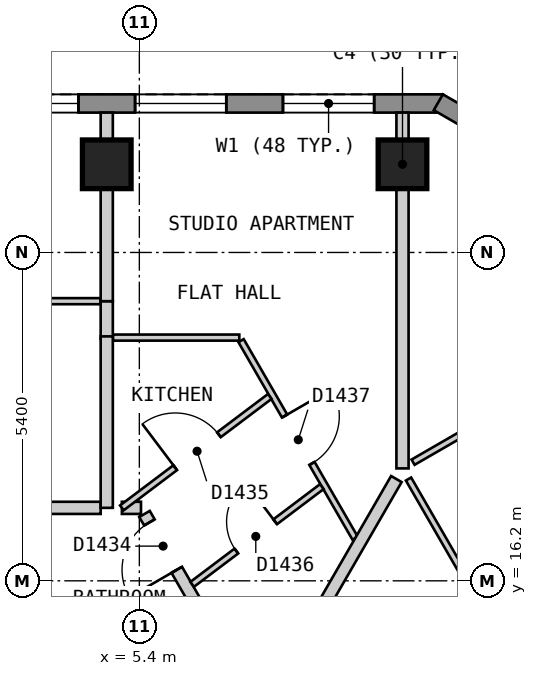
"""IFC4 building model, lengths in metres.
Left out: names, types, materials, properties, quantities, classifications, styles, units other than length and angle.
Written with IfcOpenShell. Run it as: python <this file> out.ifc"""

import sys

from ifc_helpers import new_model, si_unit, direction, frame, frame_2d, origin, origin_2d, place, context, subcontext, project, spatial, polyline, rectangle, outline, extrude, element, fill, save


model = new_model("IFC4")
c1 = context("Model", 3, precision=1e-05, world=origin(), true_north=direction((0.0, 1.0)))
c2 = subcontext(c1, "Body", "Model", "MODEL_VIEW")
j1 = project(units=[si_unit("LENGTHUNIT", "METRE"), si_unit("PLANEANGLEUNIT", "RADIAN")], contexts=[c1])
p1 = place(None, origin())
s1 = spatial("IfcSite", under=j1, at=p1, CompositionType="ELEMENT")
p2 = place(p1, origin())
s2 = spatial("IfcBuilding", under=s1, at=p2, CompositionType="ELEMENT")
p3 = place(p2, frame((0.0, 0.0, 166.2)))
s3 = spatial("IfcBuildingStorey", under=s2, at=p3, CompositionType="ELEMENT", Elevation=166.2)
for number, where, z_axis, x_axis in (
    (1, (9.728, 23.05, 0.0), (0.0, 0.0, 1.0), (-1.0, 0.0, 0.0)),
    (2, (4.864, 23.05, 0.0), (0.0, 0.0, 1.0), (-1.0, 0.0, 0.0)),
):
    element("IfcColumn", number, at=place(p3, frame(where, z_axis=z_axis, x_axis=x_axis)), inside=s3, PredefinedType="COLUMN", context=c2, shape_type="SweptSolid", body=[
        extrude(rectangle(XDim=0.8, YDim=0.8, at=origin_2d()), origin(), (0.0, 0.0, 1.0), 3.0),
    ])
p4 = place(p3, frame((10.392, 24.05, 0.0), z_axis=(0.0, 0.0, 1.0), x_axis=(-1.0, 0.0, 0.0)))
e3 = element("IfcWall", 3, at=p4, inside=s3, PredefinedType="SOLIDWALL", context=c2, shape_type="SweptSolid", body=[
    extrude(outline(polyline([(0.0, -0.15), (20.784, -0.15), (20.704, 0.15), (0.08, 0.15), (0.0, -0.15)])), origin(), (0.0, 0.0, 1.0), 2.7),
])
p5 = place(p4, frame((1.13, 0.0, 0.15)))
e4 = element("IfcOpeningElement", 4, at=p5, cuts=e3, PredefinedType="OPENING", context=c2, shape_type="SweptSolid", body=[
    extrude(rectangle(XDim=1.5, YDim=2.1, at=frame_2d((0.75, 1.05))), frame((0.0, 0.16, 0.0), z_axis=(0.0, -1.0, 0.0), x_axis=(1.0, 0.0, 0.0)), (0.0, 0.0, 1.0), 0.32),
])
p6 = place(p4, frame((3.562, 0.0, 0.15)))
e5 = element("IfcOpeningElement", 5, at=p6, cuts=e3, PredefinedType="OPENING", context=c2, shape_type="SweptSolid", body=[
    extrude(rectangle(XDim=1.5, YDim=2.1, at=frame_2d((0.75, 1.05))), frame((0.0, 0.16, 0.0), z_axis=(0.0, -1.0, 0.0), x_axis=(1.0, 0.0, 0.0)), (0.0, 0.0, 1.0), 0.32),
])
p7 = place(p4, frame((5.994, 0.0, 0.15)))
e6 = element("IfcOpeningElement", 6, at=p7, cuts=e3, PredefinedType="OPENING", context=c2, shape_type="SweptSolid", body=[
    extrude(rectangle(XDim=1.5, YDim=2.1, at=frame_2d((0.75, 1.05))), frame((0.0, 0.16, 0.0), z_axis=(0.0, -1.0, 0.0), x_axis=(1.0, 0.0, 0.0)), (0.0, 0.0, 1.0), 0.32),
])
p8 = place(p4, frame((8.426, 0.0, 0.15)))
e7 = element("IfcOpeningElement", 7, at=p8, cuts=e3, PredefinedType="OPENING", context=c2, shape_type="SweptSolid", body=[
    extrude(rectangle(XDim=1.5, YDim=2.1, at=frame_2d((0.75, 1.05))), frame((0.0, 0.16, 0.0), z_axis=(0.0, -1.0, 0.0), x_axis=(1.0, 0.0, 0.0)), (0.0, 0.0, 1.0), 0.32),
])
p9 = place(p4, frame((10.858, 0.0, 0.15)))
e8 = element("IfcOpeningElement", 8, at=p9, cuts=e3, PredefinedType="OPENING", context=c2, shape_type="SweptSolid", body=[
    extrude(rectangle(XDim=1.5, YDim=2.1, at=frame_2d((0.75, 1.05))), frame((0.0, 0.16, 0.0), z_axis=(0.0, -1.0, 0.0), x_axis=(1.0, 0.0, 0.0)), (0.0, 0.0, 1.0), 0.32),
])
p10 = place(p4, frame((13.29, 0.0, 0.15)))
e9 = element("IfcOpeningElement", 9, at=p10, cuts=e3, PredefinedType="OPENING", context=c2, shape_type="SweptSolid", body=[
    extrude(rectangle(XDim=1.5, YDim=2.1, at=frame_2d((0.75, 1.05))), frame((0.0, 0.16, 0.0), z_axis=(0.0, -1.0, 0.0), x_axis=(1.0, 0.0, 0.0)), (0.0, 0.0, 1.0), 0.32),
])
p11 = place(p4, frame((15.722, 0.0, 0.15)))
e10 = element("IfcOpeningElement", 10, at=p11, cuts=e3, PredefinedType="OPENING", context=c2, shape_type="SweptSolid", body=[
    extrude(rectangle(XDim=1.5, YDim=2.1, at=frame_2d((0.75, 1.05))), frame((0.0, 0.16, 0.0), z_axis=(0.0, -1.0, 0.0), x_axis=(1.0, 0.0, 0.0)), (0.0, 0.0, 1.0), 0.32),
])
p12 = place(p4, frame((18.154, 0.0, 0.15)))
e11 = element("IfcOpeningElement", 11, at=p12, cuts=e3, PredefinedType="OPENING", context=c2, shape_type="SweptSolid", body=[
    extrude(rectangle(XDim=1.5, YDim=2.1, at=frame_2d((0.75, 1.05))), frame((0.0, 0.16, 0.0), z_axis=(0.0, -1.0, 0.0), x_axis=(1.0, 0.0, 0.0)), (0.0, 0.0, 1.0), 0.32),
])
p13 = place(p3, frame((14.647, 21.57, 0.0), z_axis=(0.0, 0.0, 1.0), x_axis=(-0.866022959057, 0.500004234368, 0.0)))
e12 = element("IfcWall", 12, at=p13, inside=s3, PredefinedType="SOLIDWALL", context=c2, shape_type="SweptSolid", body=[
    extrude(outline(polyline([(0.0, -0.15), (5.0, -0.15), (4.92, 0.15), (0.08, 0.15), (0.0, -0.15)])), origin(), (0.0, 0.0, 1.0), 2.7),
])
p14 = place(p13, frame((0.65, 0.0, 0.15)))
e13 = element("IfcOpeningElement", 13, at=p14, cuts=e12, PredefinedType="OPENING", context=c2, shape_type="SweptSolid", body=[
    extrude(rectangle(XDim=1.2, YDim=2.1, at=frame_2d((0.6, 1.05))), frame((0.0, 0.16, 0.0), z_axis=(0.0, -1.0, 0.0), x_axis=(1.0, 0.0, 0.0)), (0.0, 0.0, 1.0), 0.32),
])
p15 = place(p13, frame((3.15, 0.0, 0.15)))
e14 = element("IfcOpeningElement", 14, at=p15, cuts=e12, PredefinedType="OPENING", context=c2, shape_type="SweptSolid", body=[
    extrude(rectangle(XDim=1.2, YDim=2.1, at=frame_2d((0.6, 1.05))), frame((0.0, 0.16, 0.0), z_axis=(0.0, -1.0, 0.0), x_axis=(1.0, 0.0, 0.0)), (0.0, 0.0, 1.0), 0.32),
])
p16 = place(p3, frame((5.485, 17.3, 0.0), z_axis=(0.0, 0.0, 1.0), x_axis=(0.499965832213, -0.866045129667, 0.0)))
e15 = element("IfcWall", 15, at=p16, inside=s3, PredefinedType="PARTITIONING", context=c2, shape_type="SweptSolid", body=[
    extrude(rectangle(XDim=10.739, YDim=0.2, at=frame_2d((5.369, 0.0))), origin(), (0.0, 0.0, 1.0), 2.7),
])
p17 = place(p16, frame((9.048, 0.0, 0.0)))
e16 = element("IfcOpeningElement", 16, at=p17, cuts=e15, PredefinedType="OPENING", context=c2, shape_type="SweptSolid", body=[
    extrude(rectangle(XDim=1.0, YDim=2.1, at=frame_2d((0.5, 1.05))), frame((0.0, 0.11, 0.0), z_axis=(0.0, -1.0, 0.0), x_axis=(1.0, 0.0, 0.0)), (0.0, 0.0, 1.0), 0.22),
])
p18 = place(p16, frame((0.161, 0.0, 0.0)))
e17 = element("IfcOpeningElement", 17, at=p18, cuts=e15, PredefinedType="OPENING", context=c2, shape_type="SweptSolid", body=[
    extrude(rectangle(XDim=0.9, YDim=2.1, at=frame_2d((0.45, 1.05))), frame((0.0, 0.11, 0.0), z_axis=(0.0, -1.0, 0.0), x_axis=(1.0, 0.0, 0.0)), (0.0, 0.0, 1.0), 0.22),
])
p19 = place(p3, frame((-5.311, 17.4, 0.0), z_axis=(0.0, 0.0, 1.0), x_axis=(1.0, 0.0, 0.0)))
e18 = element("IfcWall", 18, at=p19, inside=s3, PredefinedType="PARTITIONING", context=c2, shape_type="SweptSolid", body=[
    extrude(rectangle(XDim=10.075, YDim=0.2, at=frame_2d((5.038, 0.0))), origin(), (0.0, 0.0, 1.0), 2.7),
])
p20 = place(p19, frame((2.429, 0.0, 0.0)))
e19 = element("IfcOpeningElement", 19, at=p20, cuts=e18, PredefinedType="OPENING", context=c2, shape_type="SweptSolid", body=[
    extrude(rectangle(XDim=0.9, YDim=2.1, at=frame_2d((0.45, 1.05))), frame((0.0, 0.11, 0.0), z_axis=(0.0, -1.0, 0.0), x_axis=(1.0, 0.0, 0.0)), (0.0, 0.0, 1.0), 0.22),
])
p21 = place(p3, frame((5.113, 17.4, 0.0), z_axis=(0.0, 0.0, 1.0), x_axis=(1.0, 0.0, 0.0)))
e20 = element("IfcWall", 20, at=p21, inside=s3, PredefinedType="PARTITIONING", context=c2, shape_type="SweptSolid", body=[
    extrude(rectangle(XDim=0.314, YDim=0.2, at=frame_2d((0.157, 0.0))), origin(), (0.0, 0.0, 1.0), 2.7),
])
p22 = place(p3, frame((7.073, 20.15, 0.0), z_axis=(0.0, 0.0, 1.0), x_axis=(0.499917691695, -0.866072919292, 0.0)))
e21 = element("IfcWall", 21, at=p22, inside=s3, PredefinedType="PARTITIONING", context=c2, shape_type="SweptSolid", body=[
    extrude(rectangle(XDim=3.753, YDim=0.1, at=frame_2d((1.876, 0.0))), origin(), (0.0, 0.0, 1.0), 2.7),
])
p23 = place(p22, frame((1.432, 0.0, 0.0)))
e22 = element("IfcOpeningElement", 22, at=p23, cuts=e21, PredefinedType="OPENING", context=c2, shape_type="SweptSolid", body=[
    extrude(rectangle(XDim=0.9, YDim=2.1, at=frame_2d((0.45, 1.05))), frame((0.0, 0.06, 0.0), z_axis=(0.0, -1.0, 0.0), x_axis=(1.0, 0.0, 0.0)), (0.0, 0.0, 1.0), 0.12),
])
p24 = place(p3, frame((9.827, 17.874, 0.0), z_axis=(0.0, 0.0, 1.0), x_axis=(0.499962189394, -0.866047232647, 0.0)))
e23 = element("IfcWall", 23, at=p24, inside=s3, PredefinedType="PARTITIONING", context=c2, shape_type="SweptSolid", body=[
    extrude(rectangle(XDim=11.401, YDim=0.1, at=frame_2d((5.701, 0.0))), origin(), (0.0, 0.0, 1.0), 2.7),
])
p25 = place(p24, frame((7.433, 0.0, 0.0)))
e24 = element("IfcOpeningElement", 24, at=p25, cuts=e23, PredefinedType="OPENING", context=c2, shape_type="SweptSolid", body=[
    extrude(rectangle(XDim=0.9, YDim=2.1, at=frame_2d((0.45, 1.05))), frame((0.0, 0.06, 0.0), z_axis=(0.0, -1.0, 0.0), x_axis=(1.0, 0.0, 0.0)), (0.0, 0.0, 1.0), 0.12),
])
p26 = place(p3, frame((4.964, 20.2, 0.0), z_axis=(0.0, 0.0, 1.0), x_axis=(1.0, 0.0, 0.0)))
e25 = element("IfcWall", 25, at=p26, inside=s3, PredefinedType="PARTITIONING", context=c2, shape_type="SweptSolid", body=[
    extrude(rectangle(XDim=2.08, YDim=0.1, at=frame_2d((1.04, 0.0))), origin(), (0.0, 0.0, 1.0), 2.7),
])
p27 = place(p3, frame((0.05, 20.799, 0.0), z_axis=(0.0, 0.0, 1.0), x_axis=(1.0, 0.0, 0.0)))
e26 = element("IfcWall", 26, at=p27, inside=s3, PredefinedType="PARTITIONING", context=c2, shape_type="SweptSolid", body=[
    extrude(rectangle(XDim=4.714, YDim=0.1, at=frame_2d((2.357, 0.0))), origin(), (0.0, 0.0, 1.0), 2.7),
])
p28 = place(p27, frame((1.982, 0.0, 0.0)))
e27 = element("IfcOpeningElement", 27, at=p28, cuts=e26, PredefinedType="OPENING", context=c2, shape_type="SweptSolid", body=[
    extrude(rectangle(XDim=0.8, YDim=2.1, at=frame_2d((0.4, 1.05))), frame((0.0, 0.06, 0.0), z_axis=(0.0, -1.0, 0.0), x_axis=(1.0, 0.0, 0.0)), (0.0, 0.0, 1.0), 0.12),
])
p29 = place(p3, frame((9.902, 18.151, 0.0), z_axis=(0.0, 0.0, 1.0), x_axis=(0.866032278734, 0.499988092049, 0.0)))
e28 = element("IfcWall", 28, at=p29, inside=s3, PredefinedType="PARTITIONING", context=c2, shape_type="SweptSolid", body=[
    extrude(rectangle(XDim=5.649, YDim=0.1, at=frame_2d((2.824, 0.0))), origin(), (0.0, 0.0, 1.0), 2.7),
])
p30 = place(p29, frame((2.274, 0.0, 0.0)))
e29 = element("IfcOpeningElement", 29, at=p30, cuts=e28, PredefinedType="OPENING", context=c2, shape_type="SweptSolid", body=[
    extrude(rectangle(XDim=0.9, YDim=2.1, at=frame_2d((0.45, 1.05))), frame((0.0, 0.06, 0.0), z_axis=(0.0, -1.0, 0.0), x_axis=(1.0, 0.0, 0.0)), (0.0, 0.0, 1.0), 0.12),
])
p31 = place(p3, frame((6.269, 16.142, 0.0), z_axis=(0.0, 0.0, 1.0), x_axis=(0.798549086509, 0.601929693931, 0.0)))
e30 = element("IfcWall", 30, at=p31, inside=s3, PredefinedType="PARTITIONING", context=c2, shape_type="SweptSolid", body=[
    extrude(rectangle(XDim=2.67, YDim=0.1, at=frame_2d((1.335, 0.0))), origin(), (0.0, 0.0, 1.0), 2.7),
])
p32 = place(p31, frame((0.91, 0.0, 0.0)))
e31 = element("IfcOpeningElement", 31, at=p32, cuts=e30, PredefinedType="OPENING", context=c2, shape_type="SweptSolid", body=[
    extrude(rectangle(XDim=0.8, YDim=2.1, at=frame_2d((0.4, 1.05))), frame((0.0, 0.06, 0.0), z_axis=(0.0, -1.0, 0.0), x_axis=(1.0, 0.0, 0.0)), (0.0, 0.0, 1.0), 0.12),
])
p33 = place(p3, frame((5.113, 17.4, 0.0), z_axis=(0.0, 0.0, 1.0), x_axis=(0.798718434647, 0.601704962714, 0.0)))
e32 = element("IfcWall", 32, at=p33, inside=s3, PredefinedType="PARTITIONING", context=c2, shape_type="SweptSolid", body=[
    extrude(rectangle(XDim=3.045, YDim=0.1, at=frame_2d((1.522, 0.0))), origin(), (0.0, 0.0, 1.0), 2.7),
])
p34 = place(p33, frame((1.098, 0.0, 0.0)))
e33 = element("IfcOpeningElement", 33, at=p34, cuts=e32, PredefinedType="OPENING", context=c2, shape_type="SweptSolid", body=[
    extrude(rectangle(XDim=0.9, YDim=2.1, at=frame_2d((0.45, 1.05))), frame((0.0, 0.06, 0.0), z_axis=(0.0, -1.0, 0.0), x_axis=(1.0, 0.0, 0.0)), (0.0, 0.0, 1.0), 0.12),
])
p35 = place(p3, frame((4.864, 20.799, 0.0), z_axis=(0.0, 0.0, 1.0), x_axis=(0.0, -1.0, 0.0)))
e34 = element("IfcWall", 34, at=p35, inside=s3, PredefinedType="PARTITIONING", context=c2, shape_type="SweptSolid", body=[
    extrude(rectangle(XDim=0.619, YDim=0.2, at=frame_2d((0.31, 0.0))), origin(), (0.0, 0.0, 1.0), 2.7),
])
p36 = place(p3, frame((7.448, 14.1, 0.0), z_axis=(0.0, 0.0, 1.0), x_axis=(0.500013426303, 0.866017651966, 0.0)))
e35 = element("IfcWall", 35, at=p36, inside=s3, PredefinedType="PARTITIONING", context=c2, shape_type="SweptSolid", body=[
    extrude(rectangle(XDim=4.358, YDim=0.2, at=frame_2d((2.179, 0.0))), origin(), (0.0, 0.0, 1.0), 2.7),
])
p37 = place(p3, frame((4.864, 17.4, 0.0), z_axis=(0.0, 0.0, 1.0), x_axis=(0.0, 1.0, 0.0)))
e36 = element("IfcWall", 36, at=p37, inside=s3, PredefinedType="PARTITIONING", context=c2, shape_type="SweptSolid", body=[
    extrude(rectangle(XDim=2.82, YDim=0.2, at=frame_2d((1.41, 0.0))), origin(), (0.0, 0.0, 1.0), 2.7),
])
p38 = place(p3, frame((4.864, 20.799, 0.0), z_axis=(0.0, 0.0, 1.0), x_axis=(0.0, 1.0, 0.0)))
e37 = element("IfcWall", 37, at=p38, inside=s3, PredefinedType="PARTITIONING", context=c2, shape_type="SweptSolid", body=[
    extrude(rectangle(XDim=3.101, YDim=0.2, at=frame_2d((1.55, 0.0))), origin(), (0.0, 0.0, 1.0), 2.7),
])
p39 = place(p3, frame((9.728, 18.049, 0.0), z_axis=(0.0, 0.0, 1.0), x_axis=(0.0, 1.0, 0.0)))
e38 = element("IfcWall", 38, at=p39, inside=s3, PredefinedType="PARTITIONING", context=c2, shape_type="SweptSolid", body=[
    extrude(rectangle(XDim=5.851, YDim=0.2, at=frame_2d((2.925, 0.0))), origin(), (0.0, 0.0, 1.0), 2.7),
])
p40 = place(p5, origin())
e39 = element("IfcWindow", 39, at=p40, inside=s3, PartitioningType="SINGLE_PANEL", PredefinedType="WINDOW", context=c2, shape_type="SweptSolid", body=[
    extrude(rectangle(XDim=1.5, YDim=2.1, at=frame_2d((0.75, 1.05))), frame((0.0, 0.03, 0.0), z_axis=(0.0, -1.0, 0.0), x_axis=(1.0, 0.0, 0.0)), (0.0, 0.0, 1.0), 0.06),
])
fill(e4, e39)
p41 = place(p6, origin())
e40 = element("IfcWindow", 40, at=p41, inside=s3, PartitioningType="SINGLE_PANEL", PredefinedType="WINDOW", context=c2, shape_type="SweptSolid", body=[
    extrude(rectangle(XDim=1.5, YDim=2.1, at=frame_2d((0.75, 1.05))), frame((0.0, 0.03, 0.0), z_axis=(0.0, -1.0, 0.0), x_axis=(1.0, 0.0, 0.0)), (0.0, 0.0, 1.0), 0.06),
])
fill(e5, e40)
p42 = place(p7, origin())
e41 = element("IfcWindow", 41, at=p42, inside=s3, PartitioningType="SINGLE_PANEL", PredefinedType="WINDOW", context=c2, shape_type="SweptSolid", body=[
    extrude(rectangle(XDim=1.5, YDim=2.1, at=frame_2d((0.75, 1.05))), frame((0.0, 0.03, 0.0), z_axis=(0.0, -1.0, 0.0), x_axis=(1.0, 0.0, 0.0)), (0.0, 0.0, 1.0), 0.06),
])
fill(e6, e41)
p43 = place(p18, origin())
e42 = element("IfcDoor", 42, at=p43, inside=s3, OperationType="SINGLE_SWING_RIGHT", PredefinedType="DOOR", context=c2, shape_type="SweptSolid", body=[
    extrude(rectangle(XDim=0.9, YDim=2.1, at=frame_2d((0.45, 1.05))), frame((0.0, 0.025, 0.0), z_axis=(0.0, -1.0, 0.0), x_axis=(1.0, 0.0, 0.0)), (0.0, 0.0, 1.0), 0.05),
])
fill(e17, e42)
p44 = place(p34, origin())
e43 = element("IfcDoor", 43, at=p44, inside=s3, OperationType="SINGLE_SWING_LEFT", PredefinedType="DOOR", context=c2, shape_type="SweptSolid", body=[
    extrude(rectangle(XDim=0.9, YDim=2.1, at=frame_2d((0.45, 1.05))), frame((0.0, 0.025, 0.0), z_axis=(0.0, -1.0, 0.0), x_axis=(1.0, 0.0, 0.0)), (0.0, 0.0, 1.0), 0.05),
])
fill(e33, e43)
p45 = place(p32, origin())
e44 = element("IfcDoor", 44, at=p45, inside=s3, OperationType="SINGLE_SWING_RIGHT", PredefinedType="DOOR", context=c2, shape_type="SweptSolid", body=[
    extrude(rectangle(XDim=0.8, YDim=2.1, at=frame_2d((0.4, 1.05))), frame((0.0, 0.025, 0.0), z_axis=(0.0, -1.0, 0.0), x_axis=(1.0, 0.0, 0.0)), (0.0, 0.0, 1.0), 0.05),
])
fill(e31, e44)
p46 = place(p23, origin())
e45 = element("IfcDoor", 45, at=p46, inside=s3, OperationType="SINGLE_SWING_LEFT", PredefinedType="DOOR", context=c2, shape_type="SweptSolid", body=[
    extrude(rectangle(XDim=0.9, YDim=2.1, at=frame_2d((0.45, 1.05))), frame((0.0, 0.025, 0.0), z_axis=(0.0, -1.0, 0.0), x_axis=(1.0, 0.0, 0.0)), (0.0, 0.0, 1.0), 0.05),
])
fill(e22, e45)
save(model, sys.argv[1])
